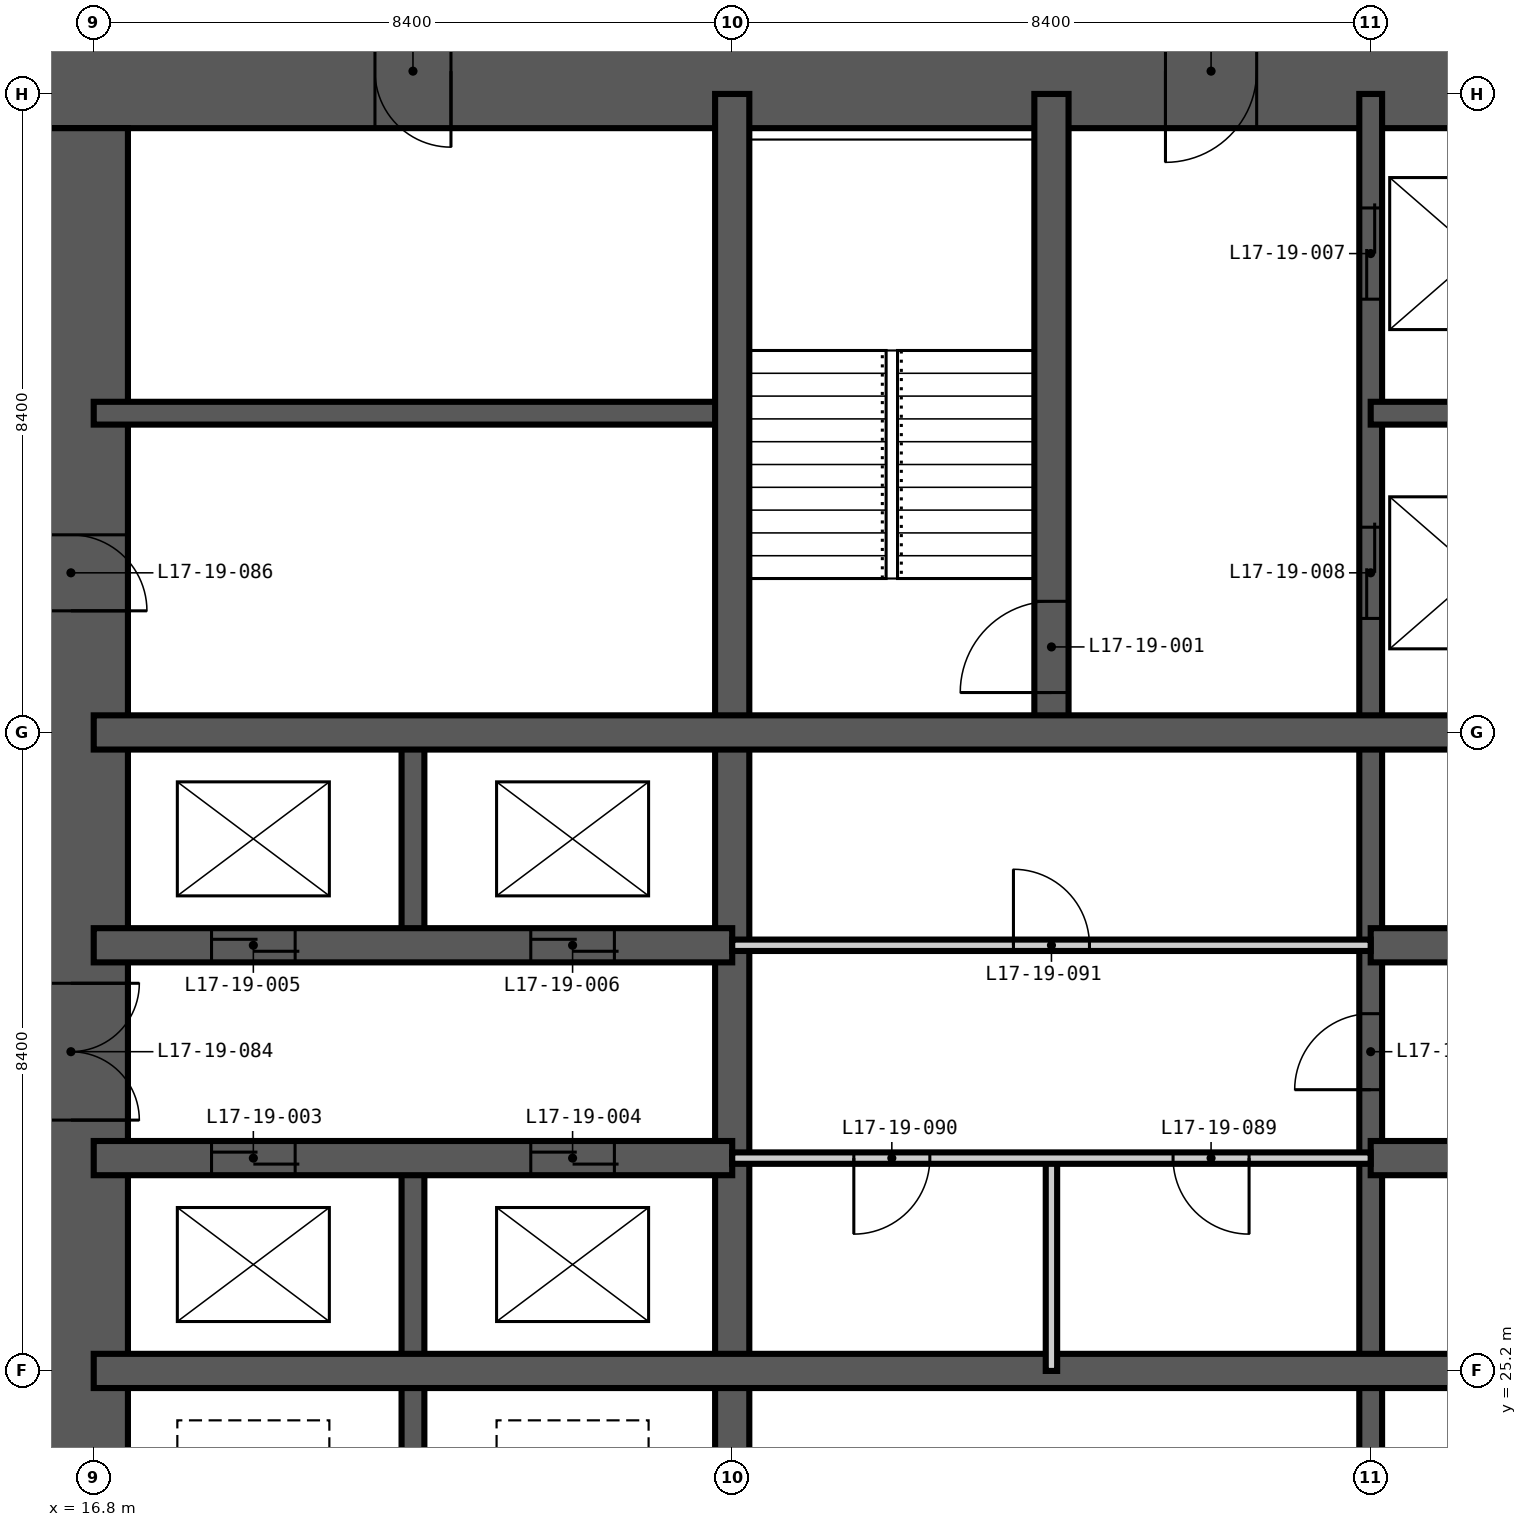
"""IFC4 building model, lengths in metres.
Left out: names, types, materials, properties, quantities, classifications, styles, units other than length and angle.
Written with IfcOpenShell. Run it as: python <this file> out.ifc"""

import sys

from ifc_helpers import new_model, si_unit, direction, frame, frame_2d, origin, place, context, subcontext, project, spatial, rectangle, extrude, element, fill, save


model = new_model("IFC4")
c1 = context("Model", 3, precision=1e-05, world=origin(), true_north=direction((0.0, 1.0)))
c2 = subcontext(c1, "Body", "Model", "MODEL_VIEW")
j1 = project(units=[si_unit("LENGTHUNIT", "METRE"), si_unit("PLANEANGLEUNIT", "RADIAN")], contexts=[c1])
p1 = place(None, origin())
s1 = spatial("IfcSite", under=j1, at=p1, CompositionType="ELEMENT")
p2 = place(p1, origin())
s2 = spatial("IfcBuilding", under=s1, at=p2, CompositionType="ELEMENT")
p3 = place(p2, frame((0.0, 0.0, 70.2)))
s3 = spatial("IfcBuildingStorey", under=s2, at=p3, CompositionType="ELEMENT", Elevation=70.2)
p4 = place(p3, frame((43.05, 42.3, -0.35), z_axis=(0.0, 0.0, 1.0), x_axis=(-1.0, 0.0, 0.0)))
e1 = element("IfcWall", 1, at=p4, inside=s3, PredefinedType="SHEAR", context=c2, shape_type="SweptSolid", body=[
    extrude(rectangle(XDim=27.3, YDim=1.5, at=frame_2d((13.65, 0.0))), origin(), (0.0, 0.0, 1.0), 3.6),
])
p5 = place(p4, frame((21.55, 0.0, 0.35)))
e2 = element("IfcOpeningElement", 2, at=p5, cuts=e1, PredefinedType="OPENING", context=c2, shape_type="SweptSolid", body=[
    extrude(rectangle(XDim=1.0, YDim=2.1, at=frame_2d((0.5, 1.05))), frame((0.0, 0.76, 0.0), z_axis=(0.0, -1.0, 0.0), x_axis=(1.0, 0.0, 0.0)), (0.0, 0.0, 1.0), 1.52),
])
p6 = place(p4, frame((10.95, 0.0, 0.35)))
e3 = element("IfcOpeningElement", 3, at=p6, cuts=e1, PredefinedType="OPENING", context=c2, shape_type="SweptSolid", body=[
    extrude(rectangle(XDim=1.2, YDim=2.2, at=frame_2d((0.6, 1.1))), frame((0.0, 0.76, 0.0), z_axis=(0.0, -1.0, 0.0), x_axis=(1.0, 0.0, 0.0)), (0.0, 0.0, 1.0), 1.52),
])
p7 = place(p3, frame((16.5, 41.55, -0.35), z_axis=(0.0, 0.0, 1.0), x_axis=(0.0, -1.0, 0.0)))
e4 = element("IfcWall", 4, at=p7, inside=s3, PredefinedType="SHEAR", context=c2, shape_type="SweptSolid", body=[
    extrude(rectangle(XDim=24.3, YDim=1.5, at=frame_2d((12.15, 0.0))), origin(), (0.0, 0.0, 1.0), 3.6),
])
p8 = place(p7, frame((11.25, 0.0, 0.35)))
e5 = element("IfcOpeningElement", 5, at=p8, cuts=e4, PredefinedType="OPENING", context=c2, shape_type="SweptSolid", body=[
    extrude(rectangle(XDim=1.8, YDim=2.2, at=frame_2d((0.9, 1.1))), frame((0.0, 0.76, 0.0), z_axis=(0.0, -1.0, 0.0), x_axis=(1.0, 0.0, 0.0)), (0.0, 0.0, 1.0), 1.52),
])
p9 = place(p7, frame((20.05, 0.0, 0.35)))
e6 = element("IfcOpeningElement", 6, at=p9, cuts=e4, PredefinedType="OPENING", context=c2, shape_type="SweptSolid", body=[
    extrude(rectangle(XDim=1.0, YDim=2.1, at=frame_2d((0.5, 1.05))), frame((0.0, 0.76, 0.0), z_axis=(0.0, -1.0, 0.0), x_axis=(1.0, 0.0, 0.0)), (0.0, 0.0, 1.0), 1.52),
])
p10 = place(p7, frame((5.35, 0.0, 0.35)))
e7 = element("IfcOpeningElement", 7, at=p10, cuts=e4, PredefinedType="OPENING", context=c2, shape_type="SweptSolid", body=[
    extrude(rectangle(XDim=1.0, YDim=2.1, at=frame_2d((0.5, 1.05))), frame((0.0, 0.76, 0.0), z_axis=(0.0, -1.0, 0.0), x_axis=(1.0, 0.0, 0.0)), (0.0, 0.0, 1.0), 1.52),
])
p11 = place(p3, frame((21.0, 22.4, -0.35), z_axis=(0.0, 0.0, 1.0), x_axis=(0.0, 1.0, 0.0)))
e8 = element("IfcWall", 8, at=p11, inside=s3, PredefinedType="SHEAR", context=c2, shape_type="SweptSolid", body=[
    extrude(rectangle(XDim=5.6, YDim=0.3, at=frame_2d((2.8, 0.0))), origin(), (0.0, 0.0, 1.0), 3.6),
])
p12 = place(p3, frame((21.0, 30.8, -0.35), z_axis=(0.0, 0.0, 1.0), x_axis=(0.0, 1.0, 0.0)))
e9 = element("IfcWall", 9, at=p12, inside=s3, PredefinedType="SHEAR", context=c2, shape_type="SweptSolid", body=[
    extrude(rectangle(XDim=2.8, YDim=0.3, at=frame_2d((1.4, 0.0))), origin(), (0.0, 0.0, 1.0), 3.6),
])
p13 = place(p3, frame((33.6, 16.8, -0.35), z_axis=(0.0, 0.0, 1.0), x_axis=(0.0, 1.0, 0.0)))
e10 = element("IfcWall", 10, at=p13, inside=s3, PredefinedType="SHEAR", context=c2, shape_type="SweptSolid", body=[
    extrude(rectangle(XDim=25.2, YDim=0.3, at=frame_2d((12.6, 0.0))), origin(), (0.0, 0.0, 1.0), 3.6),
])
p14 = place(p13, frame((22.5, 0.0, 0.35)))
e11 = element("IfcOpeningElement", 11, at=p14, cuts=e10, PredefinedType="OPENING", context=c2, shape_type="SweptSolid", body=[
    extrude(rectangle(XDim=1.2, YDim=2.2, at=frame_2d((0.6, 1.1))), frame((0.0, 0.16, 0.0), z_axis=(0.0, -1.0, 0.0), x_axis=(1.0, 0.0, 0.0)), (0.0, 0.0, 1.0), 0.32),
])
p15 = place(p13, frame((18.3, 0.0, 0.35)))
e12 = element("IfcOpeningElement", 12, at=p15, cuts=e10, PredefinedType="OPENING", context=c2, shape_type="SweptSolid", body=[
    extrude(rectangle(XDim=1.2, YDim=2.2, at=frame_2d((0.6, 1.1))), frame((0.0, 0.16, 0.0), z_axis=(0.0, -1.0, 0.0), x_axis=(1.0, 0.0, 0.0)), (0.0, 0.0, 1.0), 0.32),
])
p16 = place(p13, frame((12.1, 0.0, 0.35)))
e13 = element("IfcOpeningElement", 13, at=p16, cuts=e10, PredefinedType="OPENING", context=c2, shape_type="SweptSolid", body=[
    extrude(rectangle(XDim=1.0, YDim=2.1, at=frame_2d((0.5, 1.05))), frame((0.0, 0.16, 0.0), z_axis=(0.0, -1.0, 0.0), x_axis=(1.0, 0.0, 0.0)), (0.0, 0.0, 1.0), 0.32),
])
p17 = place(p3, frame((16.8, 37.8, -0.35), z_axis=(0.0, 0.0, 1.0), x_axis=(1.0, 0.0, 0.0)))
e14 = element("IfcWall", 14, at=p17, inside=s3, PredefinedType="SHEAR", context=c2, shape_type="SweptSolid", body=[
    extrude(rectangle(XDim=8.4, YDim=0.3, at=frame_2d((4.2, 0.0))), origin(), (0.0, 0.0, 1.0), 3.6),
])
p18 = place(p3, frame((33.6, 37.8, -0.35), z_axis=(0.0, 0.0, 1.0), x_axis=(1.0, 0.0, 0.0)))
e15 = element("IfcWall", 15, at=p18, inside=s3, PredefinedType="SHEAR", context=c2, shape_type="SweptSolid", body=[
    extrude(rectangle(XDim=2.8, YDim=0.3, at=frame_2d((1.4, 0.0))), origin(), (0.0, 0.0, 1.0), 3.6),
])
p19 = place(p3, frame((25.2, 16.8, -0.35), z_axis=(0.0, 0.0, 1.0), x_axis=(0.0, 1.0, 0.0)))
e16 = element("IfcWall", 16, at=p19, inside=s3, PredefinedType="SHEAR", context=c2, shape_type="SweptSolid", body=[
    extrude(rectangle(XDim=25.2, YDim=0.45, at=frame_2d((12.6, 0.0))), origin(), (0.0, 0.0, 1.0), 3.6),
])
p20 = place(p3, frame((29.4, 33.6, -0.35), z_axis=(0.0, 0.0, 1.0), x_axis=(0.0, 1.0, 0.0)))
e17 = element("IfcWall", 17, at=p20, inside=s3, PredefinedType="SHEAR", context=c2, shape_type="SweptSolid", body=[
    extrude(rectangle(XDim=8.4, YDim=0.45, at=frame_2d((4.2, 0.0))), origin(), (0.0, 0.0, 1.0), 3.6),
])
p21 = place(p20, frame((0.525, 0.0, 0.35)))
e18 = element("IfcOpeningElement", 18, at=p21, cuts=e17, PredefinedType="OPENING", context=c2, shape_type="SweptSolid", body=[
    extrude(rectangle(XDim=1.2, YDim=2.2, at=frame_2d((0.6, 1.1))), frame((0.0, 0.235, 0.0), z_axis=(0.0, -1.0, 0.0), x_axis=(1.0, 0.0, 0.0)), (0.0, 0.0, 1.0), 0.47),
])
p22 = place(p3, frame((16.8, 25.2, -0.35), z_axis=(0.0, 0.0, 1.0), x_axis=(1.0, 0.0, 0.0)))
e19 = element("IfcWall", 19, at=p22, inside=s3, PredefinedType="SHEAR", context=c2, shape_type="SweptSolid", body=[
    extrude(rectangle(XDim=25.2, YDim=0.45, at=frame_2d((12.6, 0.0))), origin(), (0.0, 0.0, 1.0), 3.6),
])
p23 = place(p3, frame((16.8, 28.0, -0.35), z_axis=(0.0, 0.0, 1.0), x_axis=(1.0, 0.0, 0.0)))
e20 = element("IfcWall", 20, at=p23, inside=s3, PredefinedType="SHEAR", context=c2, shape_type="SweptSolid", body=[
    extrude(rectangle(XDim=8.4, YDim=0.45, at=frame_2d((4.2, 0.0))), origin(), (0.0, 0.0, 1.0), 3.6),
])
p24 = place(p23, frame((1.55, 0.0, 0.35)))
e21 = element("IfcOpeningElement", 21, at=p24, cuts=e20, PredefinedType="OPENING", context=c2, shape_type="SweptSolid", body=[
    extrude(rectangle(XDim=1.1, YDim=2.2, at=frame_2d((0.55, 1.1))), frame((0.0, 0.235, 0.0), z_axis=(0.0, -1.0, 0.0), x_axis=(1.0, 0.0, 0.0)), (0.0, 0.0, 1.0), 0.47),
])
p25 = place(p23, frame((5.75, 0.0, 0.35)))
e22 = element("IfcOpeningElement", 22, at=p25, cuts=e20, PredefinedType="OPENING", context=c2, shape_type="SweptSolid", body=[
    extrude(rectangle(XDim=1.1, YDim=2.2, at=frame_2d((0.55, 1.1))), frame((0.0, 0.235, 0.0), z_axis=(0.0, -1.0, 0.0), x_axis=(1.0, 0.0, 0.0)), (0.0, 0.0, 1.0), 0.47),
])
p26 = place(p3, frame((33.6, 28.0, -0.35), z_axis=(0.0, 0.0, 1.0), x_axis=(1.0, 0.0, 0.0)))
e23 = element("IfcWall", 23, at=p26, inside=s3, PredefinedType="SHEAR", context=c2, shape_type="SweptSolid", body=[
    extrude(rectangle(XDim=8.4, YDim=0.45, at=frame_2d((4.2, 0.0))), origin(), (0.0, 0.0, 1.0), 3.6),
])
p27 = place(p3, frame((16.8, 30.8, -0.35), z_axis=(0.0, 0.0, 1.0), x_axis=(1.0, 0.0, 0.0)))
e24 = element("IfcWall", 24, at=p27, inside=s3, PredefinedType="SHEAR", context=c2, shape_type="SweptSolid", body=[
    extrude(rectangle(XDim=8.4, YDim=0.45, at=frame_2d((4.2, 0.0))), origin(), (0.0, 0.0, 1.0), 3.6),
])
p28 = place(p27, frame((1.55, 0.0, 0.35)))
e25 = element("IfcOpeningElement", 25, at=p28, cuts=e24, PredefinedType="OPENING", context=c2, shape_type="SweptSolid", body=[
    extrude(rectangle(XDim=1.1, YDim=2.2, at=frame_2d((0.55, 1.1))), frame((0.0, 0.235, 0.0), z_axis=(0.0, -1.0, 0.0), x_axis=(1.0, 0.0, 0.0)), (0.0, 0.0, 1.0), 0.47),
])
p29 = place(p27, frame((5.75, 0.0, 0.35)))
e26 = element("IfcOpeningElement", 26, at=p29, cuts=e24, PredefinedType="OPENING", context=c2, shape_type="SweptSolid", body=[
    extrude(rectangle(XDim=1.1, YDim=2.2, at=frame_2d((0.55, 1.1))), frame((0.0, 0.235, 0.0), z_axis=(0.0, -1.0, 0.0), x_axis=(1.0, 0.0, 0.0)), (0.0, 0.0, 1.0), 0.47),
])
p30 = place(p3, frame((33.6, 30.8, -0.35), z_axis=(0.0, 0.0, 1.0), x_axis=(1.0, 0.0, 0.0)))
e27 = element("IfcWall", 27, at=p30, inside=s3, PredefinedType="SHEAR", context=c2, shape_type="SweptSolid", body=[
    extrude(rectangle(XDim=8.4, YDim=0.45, at=frame_2d((4.2, 0.0))), origin(), (0.0, 0.0, 1.0), 3.6),
])
p31 = place(p30, frame((1.6, 0.0, 0.35)))
e28 = element("IfcOpeningElement", 28, at=p31, cuts=e27, PredefinedType="OPENING", context=c2, shape_type="SweptSolid", body=[
    extrude(rectangle(XDim=1.0, YDim=2.1, at=frame_2d((0.5, 1.05))), frame((0.0, 0.235, 0.0), z_axis=(0.0, -1.0, 0.0), x_axis=(1.0, 0.0, 0.0)), (0.0, 0.0, 1.0), 0.47),
])
p32 = place(p30, frame((4.6, 0.0, 0.35)))
e29 = element("IfcOpeningElement", 29, at=p32, cuts=e27, PredefinedType="OPENING", context=c2, shape_type="SweptSolid", body=[
    extrude(rectangle(XDim=1.0, YDim=2.1, at=frame_2d((0.5, 1.05))), frame((0.0, 0.235, 0.0), z_axis=(0.0, -1.0, 0.0), x_axis=(1.0, 0.0, 0.0)), (0.0, 0.0, 1.0), 0.47),
])
p33 = place(p3, frame((16.8, 33.6, -0.35), z_axis=(0.0, 0.0, 1.0), x_axis=(1.0, 0.0, 0.0)))
e30 = element("IfcWall", 30, at=p33, inside=s3, PredefinedType="SHEAR", context=c2, shape_type="SweptSolid", body=[
    extrude(rectangle(XDim=25.2, YDim=0.45, at=frame_2d((12.6, 0.0))), origin(), (0.0, 0.0, 1.0), 3.6),
])
p34 = place(p3, frame((29.4, 25.2, 0.0), z_axis=(0.0, 0.0, 1.0), x_axis=(0.0, 1.0, 0.0)))
e31 = element("IfcWall", 31, at=p34, inside=s3, PredefinedType="PARTITIONING", context=c2, shape_type="SweptSolid", body=[
    extrude(rectangle(XDim=2.8, YDim=0.15, at=frame_2d((1.4, 0.0))), origin(), (0.0, 0.0, 1.0), 3.25),
])
p35 = place(p3, frame((25.2, 28.0, 0.0), z_axis=(0.0, 0.0, 1.0), x_axis=(1.0, 0.0, 0.0)))
e32 = element("IfcWall", 32, at=p35, inside=s3, PredefinedType="PARTITIONING", context=c2, shape_type="SweptSolid", body=[
    extrude(rectangle(XDim=8.4, YDim=0.15, at=frame_2d((4.2, 0.0))), origin(), (0.0, 0.0, 1.0), 3.25),
])
p36 = place(p35, frame((5.8, 0.0, 0.0)))
e33 = element("IfcOpeningElement", 33, at=p36, cuts=e32, PredefinedType="OPENING", context=c2, shape_type="SweptSolid", body=[
    extrude(rectangle(XDim=1.0, YDim=2.1, at=frame_2d((0.5, 1.05))), frame((0.0, 0.085, 0.0), z_axis=(0.0, -1.0, 0.0), x_axis=(1.0, 0.0, 0.0)), (0.0, 0.0, 1.0), 0.17),
])
p37 = place(p35, frame((1.6, 0.0, 0.0)))
e34 = element("IfcOpeningElement", 34, at=p37, cuts=e32, PredefinedType="OPENING", context=c2, shape_type="SweptSolid", body=[
    extrude(rectangle(XDim=1.0, YDim=2.1, at=frame_2d((0.5, 1.05))), frame((0.0, 0.085, 0.0), z_axis=(0.0, -1.0, 0.0), x_axis=(1.0, 0.0, 0.0)), (0.0, 0.0, 1.0), 0.17),
])
p38 = place(p3, frame((25.2, 30.8, 0.0), z_axis=(0.0, 0.0, 1.0), x_axis=(1.0, 0.0, 0.0)))
e35 = element("IfcWall", 35, at=p38, inside=s3, PredefinedType="PARTITIONING", context=c2, shape_type="SweptSolid", body=[
    extrude(rectangle(XDim=8.4, YDim=0.15, at=frame_2d((4.2, 0.0))), origin(), (0.0, 0.0, 1.0), 3.25),
])
p39 = place(p38, frame((3.7, 0.0, 0.0)))
e36 = element("IfcOpeningElement", 36, at=p39, cuts=e35, PredefinedType="OPENING", context=c2, shape_type="SweptSolid", body=[
    extrude(rectangle(XDim=1.0, YDim=2.1, at=frame_2d((0.5, 1.05))), frame((0.0, 0.085, 0.0), z_axis=(0.0, -1.0, 0.0), x_axis=(1.0, 0.0, 0.0)), (0.0, 0.0, 1.0), 0.17),
])
p40 = place(p21, origin())
e37 = element("IfcDoor", 37, at=p40, inside=s3, OperationType="SINGLE_SWING_LEFT", PredefinedType="DOOR", context=c2, shape_type="SweptSolid", body=[
    extrude(rectangle(XDim=1.2, YDim=2.2, at=frame_2d((0.6, 1.1))), frame((0.0, 0.025, 0.0), z_axis=(0.0, -1.0, 0.0), x_axis=(1.0, 0.0, 0.0)), (0.0, 0.0, 1.0), 0.05),
])
fill(e18, e37)
p41 = place(p24, origin())
e38 = element("IfcDoor", 38, at=p41, inside=s3, OperationType="DOUBLE_DOOR_SLIDING", PredefinedType="DOOR", context=c2, shape_type="SweptSolid", body=[
    extrude(rectangle(XDim=1.1, YDim=2.2, at=frame_2d((0.55, 1.1))), frame((0.0, 0.025, 0.0), z_axis=(0.0, -1.0, 0.0), x_axis=(1.0, 0.0, 0.0)), (0.0, 0.0, 1.0), 0.05),
])
fill(e21, e38)
p42 = place(p25, origin())
e39 = element("IfcDoor", 39, at=p42, inside=s3, OperationType="DOUBLE_DOOR_SLIDING", PredefinedType="DOOR", context=c2, shape_type="SweptSolid", body=[
    extrude(rectangle(XDim=1.1, YDim=2.2, at=frame_2d((0.55, 1.1))), frame((0.0, 0.025, 0.0), z_axis=(0.0, -1.0, 0.0), x_axis=(1.0, 0.0, 0.0)), (0.0, 0.0, 1.0), 0.05),
])
fill(e22, e39)
p43 = place(p28, origin())
e40 = element("IfcDoor", 40, at=p43, inside=s3, OperationType="DOUBLE_DOOR_SLIDING", PredefinedType="DOOR", context=c2, shape_type="SweptSolid", body=[
    extrude(rectangle(XDim=1.1, YDim=2.2, at=frame_2d((0.55, 1.1))), frame((0.0, 0.025, 0.0), z_axis=(0.0, -1.0, 0.0), x_axis=(1.0, 0.0, 0.0)), (0.0, 0.0, 1.0), 0.05),
])
fill(e25, e40)
p44 = place(p29, origin())
e41 = element("IfcDoor", 41, at=p44, inside=s3, OperationType="DOUBLE_DOOR_SLIDING", PredefinedType="DOOR", context=c2, shape_type="SweptSolid", body=[
    extrude(rectangle(XDim=1.1, YDim=2.2, at=frame_2d((0.55, 1.1))), frame((0.0, 0.025, 0.0), z_axis=(0.0, -1.0, 0.0), x_axis=(1.0, 0.0, 0.0)), (0.0, 0.0, 1.0), 0.05),
])
fill(e26, e41)
p45 = place(p14, origin())
e42 = element("IfcDoor", 42, at=p45, inside=s3, OperationType="DOUBLE_DOOR_SLIDING", PredefinedType="DOOR", context=c2, shape_type="SweptSolid", body=[
    extrude(rectangle(XDim=1.2, YDim=2.2, at=frame_2d((0.6, 1.1))), frame((0.0, 0.025, 0.0), z_axis=(0.0, -1.0, 0.0), x_axis=(1.0, 0.0, 0.0)), (0.0, 0.0, 1.0), 0.05),
])
fill(e11, e42)
p46 = place(p15, origin())
e43 = element("IfcDoor", 43, at=p46, inside=s3, OperationType="DOUBLE_DOOR_SLIDING", PredefinedType="DOOR", context=c2, shape_type="SweptSolid", body=[
    extrude(rectangle(XDim=1.2, YDim=2.2, at=frame_2d((0.6, 1.1))), frame((0.0, 0.025, 0.0), z_axis=(0.0, -1.0, 0.0), x_axis=(1.0, 0.0, 0.0)), (0.0, 0.0, 1.0), 0.05),
])
fill(e12, e43)
p47 = place(p8, origin())
e44 = element("IfcDoor", 44, at=p47, inside=s3, OperationType="DOUBLE_DOOR_DOUBLE_SWING", PredefinedType="DOOR", context=c2, shape_type="SweptSolid", body=[
    extrude(rectangle(XDim=1.8, YDim=2.2, at=frame_2d((0.9, 1.1))), frame((0.0, 0.025, 0.0), z_axis=(0.0, -1.0, 0.0), x_axis=(1.0, 0.0, 0.0)), (0.0, 0.0, 1.0), 0.05),
])
fill(e5, e44)
p48 = place(p10, origin())
e45 = element("IfcDoor", 45, at=p48, inside=s3, OperationType="SINGLE_SWING_RIGHT", PredefinedType="DOOR", context=c2, shape_type="SweptSolid", body=[
    extrude(rectangle(XDim=1.0, YDim=2.1, at=frame_2d((0.5, 1.05))), frame((0.0, 0.025, 0.0), z_axis=(0.0, -1.0, 0.0), x_axis=(1.0, 0.0, 0.0)), (0.0, 0.0, 1.0), 0.05),
])
fill(e7, e45)
p49 = place(p5, origin())
e46 = element("IfcDoor", 46, at=p49, inside=s3, OperationType="SINGLE_SWING_LEFT", PredefinedType="DOOR", context=c2, shape_type="SweptSolid", body=[
    extrude(rectangle(XDim=1.0, YDim=2.1, at=frame_2d((0.5, 1.05))), frame((0.0, 0.025, 0.0), z_axis=(0.0, -1.0, 0.0), x_axis=(1.0, 0.0, 0.0)), (0.0, 0.0, 1.0), 0.05),
])
fill(e2, e46)
p50 = place(p16, origin())
e47 = element("IfcDoor", 47, at=p50, inside=s3, OperationType="SINGLE_SWING_LEFT", PredefinedType="DOOR", context=c2, shape_type="SweptSolid", body=[
    extrude(rectangle(XDim=1.0, YDim=2.1, at=frame_2d((0.5, 1.05))), frame((0.0, 0.025, 0.0), z_axis=(0.0, -1.0, 0.0), x_axis=(1.0, 0.0, 0.0)), (0.0, 0.0, 1.0), 0.05),
])
fill(e13, e47)
p51 = place(p36, frame((1.0, 0.0, 0.0), z_axis=(0.0, 0.0, 1.0), x_axis=(-1.0, 0.0, 0.0)))
e48 = element("IfcDoor", 48, at=p51, inside=s3, OperationType="SINGLE_SWING_LEFT", PredefinedType="DOOR", context=c2, shape_type="SweptSolid", body=[
    extrude(rectangle(XDim=1.0, YDim=2.1, at=frame_2d((0.5, 1.05))), frame((0.0, 0.025, 0.0), z_axis=(0.0, -1.0, 0.0), x_axis=(1.0, 0.0, 0.0)), (0.0, 0.0, 1.0), 0.05),
])
fill(e33, e48)
p52 = place(p37, frame((1.0, 0.0, 0.0), z_axis=(0.0, 0.0, 1.0), x_axis=(-1.0, 0.0, 0.0)))
e49 = element("IfcDoor", 49, at=p52, inside=s3, OperationType="SINGLE_SWING_RIGHT", PredefinedType="DOOR", context=c2, shape_type="SweptSolid", body=[
    extrude(rectangle(XDim=1.0, YDim=2.1, at=frame_2d((0.5, 1.05))), frame((0.0, 0.025, 0.0), z_axis=(0.0, -1.0, 0.0), x_axis=(1.0, 0.0, 0.0)), (0.0, 0.0, 1.0), 0.05),
])
fill(e34, e49)
p53 = place(p39, origin())
e50 = element("IfcDoor", 50, at=p53, inside=s3, OperationType="SINGLE_SWING_LEFT", PredefinedType="DOOR", context=c2, shape_type="SweptSolid", body=[
    extrude(rectangle(XDim=1.0, YDim=2.1, at=frame_2d((0.5, 1.05))), frame((0.0, 0.025, 0.0), z_axis=(0.0, -1.0, 0.0), x_axis=(1.0, 0.0, 0.0)), (0.0, 0.0, 1.0), 0.05),
])
fill(e36, e50)
p54 = place(p6, origin())
e51 = element("IfcDoor", 51, at=p54, inside=s3, OperationType="SINGLE_SWING_RIGHT", PredefinedType="DOOR", context=c2, shape_type="SweptSolid", body=[
    extrude(rectangle(XDim=1.2, YDim=2.2, at=frame_2d((0.6, 1.1))), frame((0.0, 0.025, 0.0), z_axis=(0.0, -1.0, 0.0), x_axis=(1.0, 0.0, 0.0)), (0.0, 0.0, 1.0), 0.05),
])
fill(e3, e51)
save(model, sys.argv[1])
